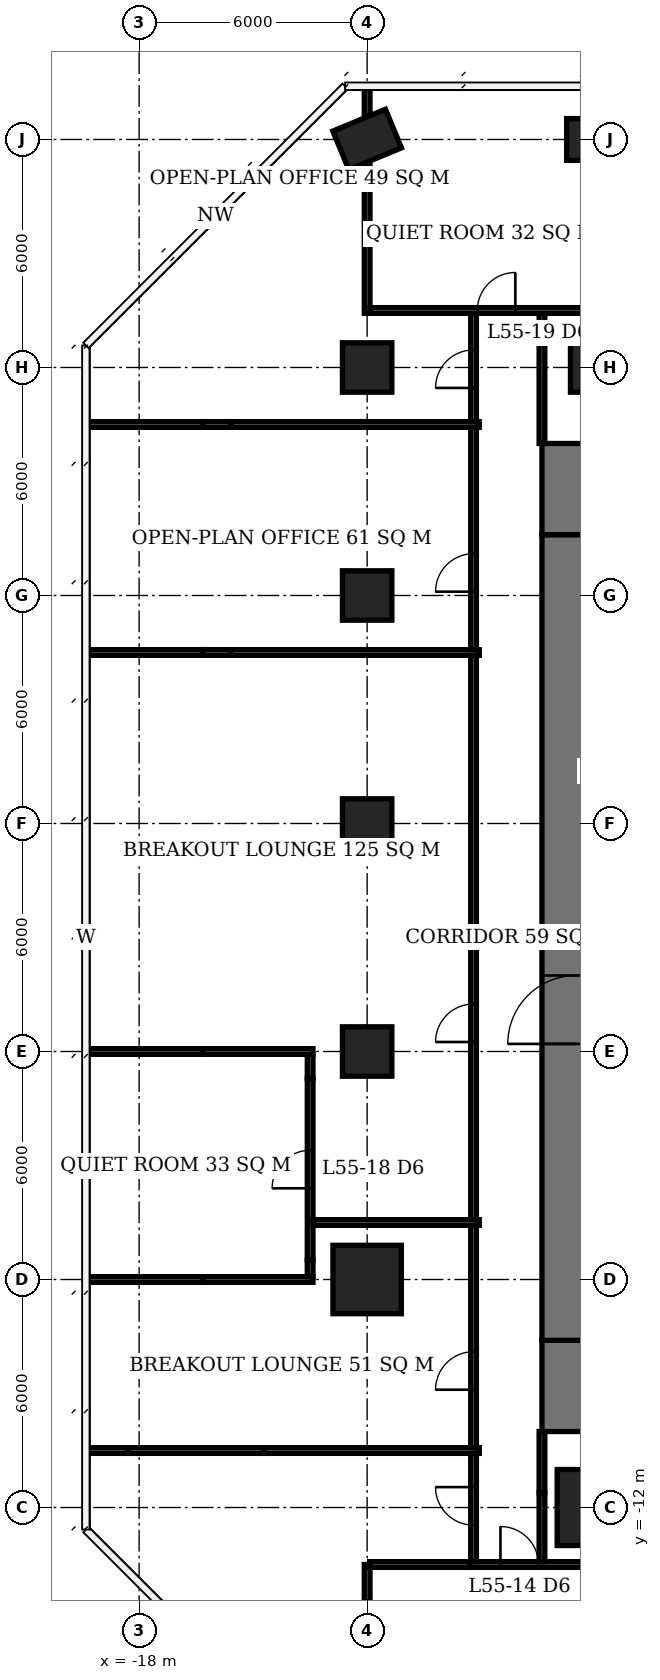
"""IFC4 building model, lengths in metres.
Left out: names, types, materials, properties, quantities, classifications, styles, units other than length and angle.
Written with IfcOpenShell. Run it as: python <this file> out.ifc"""

import sys

from ifc_helpers import new_model, si_unit, direction, frame, frame_2d, origin, origin_2d, place, context, subcontext, project, spatial, rectangle, extrude, element, fill, save


model = new_model("IFC4")
c1 = context("Model", 3, precision=1e-05, world=origin(), true_north=direction((0.0, 1.0)))
c2 = subcontext(c1, "Body", "Model", "MODEL_VIEW")
j1 = project(units=[si_unit("LENGTHUNIT", "METRE"), si_unit("PLANEANGLEUNIT", "RADIAN")], contexts=[c1])
p1 = place(None, origin())
s1 = spatial("IfcSite", under=j1, at=p1, CompositionType="ELEMENT")
p2 = place(p1, origin())
s2 = spatial("IfcBuilding", under=s1, at=p2, CompositionType="ELEMENT")
p3 = place(p2, frame((0.0, 0.0, 224.0)))
s3 = spatial("IfcBuildingStorey", under=s2, at=p3, CompositionType="ELEMENT", Elevation=224.0)
p4 = place(p3, frame((-12.0, -6.0, 0.0), z_axis=(0.0, 0.0, 1.0), x_axis=(1.0, 0.0, 0.0)))
e1 = element("IfcColumn", 1, at=p4, inside=s3, PredefinedType="COLUMN", context=c2, shape_type="SweptSolid", body=[
    extrude(rectangle(XDim=1.8, YDim=1.8, at=origin_2d()), origin(), (0.0, 0.0, 1.0), 3.9),
])
for number, where, z_axis, x_axis in (
    (2, (-12.0, 0.0, 0.0), (0.0, 0.0, 1.0), (1.0, 0.0, 0.0)),
    (3, (-12.0, 6.0, 0.0), (0.0, 0.0, 1.0), (1.0, 0.0, 0.0)),
    (4, (-12.0, 12.0, 0.0), (0.0, 0.0, 1.0), (1.0, 0.0, 0.0)),
    (5, (-12.0, 18.0, 0.0), (0.0, 0.0, 1.0), (1.0, 0.0, 0.0)),
):
    element("IfcColumn", number, at=place(p3, frame(where, z_axis=z_axis, x_axis=x_axis)), inside=s3, PredefinedType="COLUMN", context=c2, shape_type="SweptSolid", body=[
        extrude(rectangle(XDim=1.3, YDim=1.3, at=origin_2d()), origin(), (0.0, 0.0, 1.0), 3.9),
    ])
p5 = place(p3, frame((-12.0, 24.0, 0.0), z_axis=(0.0, 0.0, 1.0), x_axis=(0.923879532511, 0.382683432365, 0.0)))
e6 = element("IfcColumn", 6, at=p5, inside=s3, PredefinedType="COLUMN", context=c2, shape_type="SweptSolid", body=[
    extrude(rectangle(XDim=1.5, YDim=1.1, at=origin_2d()), origin(), (0.0, 0.0, 1.0), 3.9),
])
p6 = place(p3, frame((-6.0, -12.0, 0.0), z_axis=(0.0, 0.0, 1.0), x_axis=(1.0, 0.0, 0.0)))
e7 = element("IfcColumn", 7, at=p6, inside=s3, PredefinedType="COLUMN", context=c2, shape_type="SweptSolid", body=[
    extrude(rectangle(XDim=2.0, YDim=2.0, at=origin_2d()), origin(), (0.0, 0.0, 1.0), 3.9),
])
p7 = place(p3, frame((-6.0, 18.0, 0.0), z_axis=(0.0, 0.0, 1.0), x_axis=(1.0, 0.0, 0.0)))
e8 = element("IfcColumn", 8, at=p7, inside=s3, PredefinedType="COLUMN", context=c2, shape_type="SweptSolid", body=[
    extrude(rectangle(XDim=1.3, YDim=1.3, at=origin_2d()), origin(), (0.0, 0.0, 1.0), 3.9),
])
p8 = place(p3, frame((-6.0, 24.0, 0.0), z_axis=(0.0, 0.0, 1.0), x_axis=(1.0, 0.0, 0.0)))
e9 = element("IfcColumn", 9, at=p8, inside=s3, PredefinedType="COLUMN", context=c2, shape_type="SweptSolid", body=[
    extrude(rectangle(XDim=1.5, YDim=1.1, at=origin_2d()), origin(), (0.0, 0.0, 1.0), 3.9),
])
p9 = place(p3, frame((-6.5, -7.6, 0.0), z_axis=(0.0, 0.0, 1.0), x_axis=(0.0, 1.0, 0.0)))
e10 = element("IfcWall", 10, at=p9, inside=s3, PredefinedType="SHEAR", context=c2, shape_type="SweptSolid", body=[
    extrude(rectangle(XDim=21.2, YDim=1.8, at=frame_2d((10.6, 0.0))), origin(), (0.0, 0.0, 1.0), 3.9),
])
p10 = place(p9, frame((7.8, 0.0, 0.0)))
e11 = element("IfcOpeningElement", 11, at=p10, cuts=e10, PredefinedType="OPENING", context=c2, shape_type="SweptSolid", body=[
    extrude(rectangle(XDim=1.8, YDim=2.4, at=frame_2d((0.9, 1.2))), frame((0.0, 0.91, 0.0), z_axis=(0.0, -1.0, 0.0), x_axis=(1.0, 0.0, 0.0)), (0.0, 0.0, 1.0), 1.82),
])
for number, where, z_axis, x_axis in (
    (12, (-6.5, -10.0, 0.0), (0.0, 0.0, 1.0), (0.0, 1.0, 0.0)),
    (13, (-6.5, 13.6, 0.0), (0.0, 0.0, 1.0), (0.0, 1.0, 0.0)),
):
    element("IfcWall", number, at=place(p3, frame(where, z_axis=z_axis, x_axis=x_axis)), inside=s3, PredefinedType="SHEAR", context=c2, shape_type="SweptSolid", body=[
        extrude(rectangle(XDim=2.4, YDim=1.8, at=frame_2d((1.2, 0.0))), origin(), (0.0, 0.0, 1.0), 3.9),
    ])
p11 = place(p3, frame((-11.935, -13.5, 0.0), z_axis=(0.0, 0.0, 1.0), x_axis=(1.0, 0.0, 0.0)))
e14 = element("IfcWall", 14, at=p11, inside=s3, PredefinedType="PARTITIONING", context=c2, shape_type="SweptSolid", body=[
    extrude(rectangle(XDim=2.643, YDim=0.15, at=frame_2d((1.322, 0.0))), origin(), (0.0, 0.0, 1.0), 3.65),
])
p12 = place(p3, frame((-9.292, -13.5, 0.0), z_axis=(0.0, 0.0, 1.0), x_axis=(1.0, 0.0, 0.0)))
e15 = element("IfcWall", 15, at=p12, inside=s3, PredefinedType="PARTITIONING", context=c2, shape_type="SweptSolid", body=[
    extrude(rectangle(XDim=3.217, YDim=0.15, at=frame_2d((1.608, 0.0))), origin(), (0.0, 0.0, 1.0), 2.65),
])
p13 = place(p12, frame((0.8, 0.0, 0.0)))
e16 = element("IfcOpeningElement", 16, at=p13, cuts=e15, PredefinedType="OPENING", context=c2, shape_type="SweptSolid", body=[
    extrude(rectangle(XDim=1.0, YDim=2.1, at=frame_2d((0.5, 1.05))), frame((0.0, 0.085, 0.0), z_axis=(0.0, -1.0, 0.0), x_axis=(1.0, 0.0, 0.0)), (0.0, 0.0, 1.0), 0.17),
])
p14 = place(p3, frame((-19.4, -6.0, 0.0), z_axis=(0.0, 0.0, 1.0), x_axis=(1.0, 0.0, 0.0)))
e17 = element("IfcWall", 17, at=p14, inside=s3, PredefinedType="PARTITIONING", context=c2, shape_type="SweptSolid", body=[
    extrude(rectangle(XDim=3.09, YDim=0.15, at=frame_2d((1.545, 0.0))), origin(), (0.0, 0.0, 1.0), 3.65),
])
p15 = place(p3, frame((-16.31, -6.0, 0.0), z_axis=(0.0, 0.0, 1.0), x_axis=(1.0, 0.0, 0.0)))
e18 = element("IfcWall", 18, at=p15, inside=s3, PredefinedType="PARTITIONING", context=c2, shape_type="SweptSolid", body=[
    extrude(rectangle(XDim=2.885, YDim=0.15, at=frame_2d((1.442, 0.0))), origin(), (0.0, 0.0, 1.0), 2.65),
])
p16 = place(p3, frame((-19.35, 0.0, 0.0), z_axis=(0.0, 0.0, 1.0), x_axis=(1.0, 0.0, 0.0)))
e19 = element("IfcWall", 19, at=p16, inside=s3, PredefinedType="PARTITIONING", context=c2, shape_type="SweptSolid", body=[
    extrude(rectangle(XDim=3.04, YDim=0.15, at=frame_2d((1.52, 0.0))), origin(), (0.0, 0.0, 1.0), 3.65),
])
p17 = place(p3, frame((-16.31, 0.0, 0.0), z_axis=(0.0, 0.0, 1.0), x_axis=(1.0, 0.0, 0.0)))
e20 = element("IfcWall", 20, at=p17, inside=s3, PredefinedType="PARTITIONING", context=c2, shape_type="SweptSolid", body=[
    extrude(rectangle(XDim=2.885, YDim=0.15, at=frame_2d((1.442, 0.0))), origin(), (0.0, 0.0, 1.0), 2.65),
])
p18 = place(p3, frame((-11.925, 19.5, 0.0), z_axis=(0.0, 0.0, 1.0), x_axis=(1.0, 0.0, 0.0)))
e21 = element("IfcWall", 21, at=p18, inside=s3, PredefinedType="PARTITIONING", context=c2, shape_type="SweptSolid", body=[
    extrude(rectangle(XDim=5.85, YDim=0.15, at=frame_2d((2.925, 0.0))), origin(), (0.0, 0.0, 1.0), 3.65),
])
p19 = place(p18, frame((2.825, 0.0, 0.0)))
e22 = element("IfcOpeningElement", 22, at=p19, cuts=e21, PredefinedType="OPENING", context=c2, shape_type="SweptSolid", body=[
    extrude(rectangle(XDim=1.0, YDim=2.1, at=frame_2d((0.5, 1.05))), frame((0.0, 0.085, 0.0), z_axis=(0.0, -1.0, 0.0), x_axis=(1.0, 0.0, 0.0)), (0.0, 0.0, 1.0), 0.17),
])
p20 = place(p3, frame((-13.5, -5.925, 0.0), z_axis=(0.0, 0.0, 1.0), x_axis=(0.0, 1.0, 0.0)))
e23 = element("IfcWall", 23, at=p20, inside=s3, PredefinedType="PARTITIONING", context=c2, shape_type="SweptSolid", body=[
    extrude(rectangle(XDim=0.435, YDim=0.15, at=frame_2d((0.218, 0.0))), origin(), (0.0, 0.0, 1.0), 2.65),
])
p21 = place(p3, frame((-13.5, -5.49, 0.0), z_axis=(0.0, 0.0, 1.0), x_axis=(0.0, 1.0, 0.0)))
e24 = element("IfcWall", 24, at=p21, inside=s3, PredefinedType="PARTITIONING", context=c2, shape_type="SweptSolid", body=[
    extrude(rectangle(XDim=4.78, YDim=0.15, at=frame_2d((2.39, 0.0))), origin(), (0.0, 0.0, 1.0), 3.65),
])
p22 = place(p21, frame((1.89, 0.0, 0.0)))
e25 = element("IfcOpeningElement", 25, at=p22, cuts=e24, PredefinedType="OPENING", context=c2, shape_type="SweptSolid", body=[
    extrude(rectangle(XDim=1.0, YDim=2.1, at=frame_2d((0.5, 1.05))), frame((0.0, 0.085, 0.0), z_axis=(0.0, -1.0, 0.0), x_axis=(1.0, 0.0, 0.0)), (0.0, 0.0, 1.0), 0.17),
])
p23 = place(p3, frame((-13.5, -0.71, 0.0), z_axis=(0.0, 0.0, 1.0), x_axis=(0.0, 1.0, 0.0)))
e26 = element("IfcWall", 26, at=p23, inside=s3, PredefinedType="PARTITIONING", context=c2, shape_type="SweptSolid", body=[
    extrude(rectangle(XDim=0.635, YDim=0.15, at=frame_2d((0.317, 0.0))), origin(), (0.0, 0.0, 1.0), 2.65),
])
p24 = place(p3, frame((-12.0, -14.49, 0.0), z_axis=(0.0, 0.0, 1.0), x_axis=(0.0, 1.0, 0.0)))
e27 = element("IfcWall", 27, at=p24, inside=s3, PredefinedType="PARTITIONING", context=c2, shape_type="SweptSolid", body=[
    extrude(rectangle(XDim=0.99, YDim=0.15, at=frame_2d((0.495, 0.0))), origin(), (0.0, 0.0, 1.0), 2.65),
])
p25 = place(p3, frame((-12.0, 19.425, 0.0), z_axis=(0.0, 0.0, 1.0), x_axis=(0.0, 1.0, 0.0)))
e28 = element("IfcWall", 28, at=p25, inside=s3, PredefinedType="PARTITIONING", context=c2, shape_type="SweptSolid", body=[
    extrude(rectangle(XDim=3.948, YDim=0.15, at=frame_2d((1.974, 0.0))), origin(), (0.0, 0.0, 1.0), 3.65),
])
p26 = place(p3, frame((-12.0, 24.626, 0.0), z_axis=(0.0, 0.0, 1.0), x_axis=(0.0, 1.0, 0.0)))
e29 = element("IfcWall", 29, at=p26, inside=s3, PredefinedType="PARTITIONING", context=c2, shape_type="SweptSolid", body=[
    extrude(rectangle(XDim=0.773, YDim=0.15, at=frame_2d((0.387, 0.0))), origin(), (0.0, 0.0, 1.0), 3.65),
])
p27 = place(p3, frame((-19.4, -10.5, 0.0), z_axis=(0.0, 0.0, 1.0), x_axis=(1.0, 0.0, 0.0)))
e30 = element("IfcWall", 30, at=p27, inside=s3, PredefinedType="PARTITIONING", context=c2, shape_type="SweptSolid", body=[
    extrude(rectangle(XDim=1.108, YDim=0.15, at=frame_2d((0.554, 0.0))), origin(), (0.0, 0.0, 1.0), 3.65),
])
p28 = place(p3, frame((-18.292, -10.5, 0.0), z_axis=(0.0, 0.0, 1.0), x_axis=(1.0, 0.0, 0.0)))
e31 = element("IfcWall", 31, at=p28, inside=s3, PredefinedType="PARTITIONING", context=c2, shape_type="SweptSolid", body=[
    extrude(rectangle(XDim=3.584, YDim=0.15, at=frame_2d((1.792, 0.0))), origin(), (0.0, 0.0, 1.0), 2.65),
])
p29 = place(p3, frame((-14.708, -10.5, 0.0), z_axis=(0.0, 0.0, 1.0), x_axis=(1.0, 0.0, 0.0)))
e32 = element("IfcWall", 32, at=p29, inside=s3, PredefinedType="PARTITIONING", context=c2, shape_type="SweptSolid", body=[
    extrude(rectangle(XDim=5.658, YDim=0.15, at=frame_2d((2.829, 0.0))), origin(), (0.0, 0.0, 1.0), 3.65),
])
p30 = place(p3, frame((-19.4, 10.5, 0.0), z_axis=(0.0, 0.0, 1.0), x_axis=(1.0, 0.0, 0.0)))
e33 = element("IfcWall", 33, at=p30, inside=s3, PredefinedType="PARTITIONING", context=c2, shape_type="SweptSolid", body=[
    extrude(rectangle(XDim=3.09, YDim=0.15, at=frame_2d((1.545, 0.0))), origin(), (0.0, 0.0, 1.0), 3.65),
])
p31 = place(p3, frame((-16.31, 10.5, 0.0), z_axis=(0.0, 0.0, 1.0), x_axis=(1.0, 0.0, 0.0)))
e34 = element("IfcWall", 34, at=p31, inside=s3, PredefinedType="PARTITIONING", context=c2, shape_type="SweptSolid", body=[
    extrude(rectangle(XDim=0.72, YDim=0.15, at=frame_2d((0.36, 0.0))), origin(), (0.0, 0.0, 1.0), 2.65),
])
p32 = place(p3, frame((-15.59, 10.5, 0.0), z_axis=(0.0, 0.0, 1.0), x_axis=(1.0, 0.0, 0.0)))
e35 = element("IfcWall", 35, at=p32, inside=s3, PredefinedType="PARTITIONING", context=c2, shape_type="SweptSolid", body=[
    extrude(rectangle(XDim=6.54, YDim=0.15, at=frame_2d((3.27, 0.0))), origin(), (0.0, 0.0, 1.0), 3.65),
])
p33 = place(p3, frame((-19.4, 16.5, 0.0), z_axis=(0.0, 0.0, 1.0), x_axis=(1.0, 0.0, 0.0)))
e36 = element("IfcWall", 36, at=p33, inside=s3, PredefinedType="PARTITIONING", context=c2, shape_type="SweptSolid", body=[
    extrude(rectangle(XDim=3.09, YDim=0.15, at=frame_2d((1.545, 0.0))), origin(), (0.0, 0.0, 1.0), 3.65),
])
p34 = place(p3, frame((-16.31, 16.5, 0.0), z_axis=(0.0, 0.0, 1.0), x_axis=(1.0, 0.0, 0.0)))
e37 = element("IfcWall", 37, at=p34, inside=s3, PredefinedType="PARTITIONING", context=c2, shape_type="SweptSolid", body=[
    extrude(rectangle(XDim=0.72, YDim=0.15, at=frame_2d((0.36, 0.0))), origin(), (0.0, 0.0, 1.0), 2.65),
])
p35 = place(p3, frame((-15.59, 16.5, 0.0), z_axis=(0.0, 0.0, 1.0), x_axis=(1.0, 0.0, 0.0)))
e38 = element("IfcWall", 38, at=p35, inside=s3, PredefinedType="PARTITIONING", context=c2, shape_type="SweptSolid", body=[
    extrude(rectangle(XDim=6.54, YDim=0.15, at=frame_2d((3.27, 0.0))), origin(), (0.0, 0.0, 1.0), 3.65),
])
p36 = place(p3, frame((-13.425, -4.5, 0.0), z_axis=(0.0, 0.0, 1.0), x_axis=(1.0, 0.0, 0.0)))
e39 = element("IfcWall", 39, at=p36, inside=s3, PredefinedType="PARTITIONING", context=c2, shape_type="SweptSolid", body=[
    extrude(rectangle(XDim=4.375, YDim=0.15, at=frame_2d((2.188, 0.0))), origin(), (0.0, 0.0, 1.0), 3.65),
])
p37 = place(p3, frame((-9.2, -13.425, 0.0), z_axis=(0.0, 0.0, 1.0), x_axis=(0.0, 1.0, 0.0)))
e40 = element("IfcWall", 40, at=p37, inside=s3, PredefinedType="PARTITIONING", context=c2, shape_type="SweptSolid", body=[
    extrude(rectangle(XDim=2.85, YDim=0.15, at=frame_2d((1.425, 0.0))), origin(), (0.0, 0.0, 1.0), 3.65),
])
p38 = place(p37, frame((0.962, 0.0, 0.0)))
e41 = element("IfcOpeningElement", 41, at=p38, cuts=e40, PredefinedType="OPENING", context=c2, shape_type="SweptSolid", body=[
    extrude(rectangle(XDim=1.0, YDim=2.1, at=frame_2d((0.5, 1.05))), frame((0.0, 0.085, 0.0), z_axis=(0.0, -1.0, 0.0), x_axis=(1.0, 0.0, 0.0)), (0.0, 0.0, 1.0), 0.17),
])
p39 = place(p3, frame((-9.2, -10.425, 0.0), z_axis=(0.0, 0.0, 1.0), x_axis=(0.0, 1.0, 0.0)))
e42 = element("IfcWall", 42, at=p39, inside=s3, PredefinedType="PARTITIONING", context=c2, shape_type="SweptSolid", body=[
    extrude(rectangle(XDim=5.85, YDim=0.15, at=frame_2d((2.925, 0.0))), origin(), (0.0, 0.0, 1.0), 3.65),
])
p40 = place(p39, frame((1.525, 0.0, 0.0)))
e43 = element("IfcOpeningElement", 43, at=p40, cuts=e42, PredefinedType="OPENING", context=c2, shape_type="SweptSolid", body=[
    extrude(rectangle(XDim=1.0, YDim=2.1, at=frame_2d((0.5, 1.05))), frame((0.0, 0.085, 0.0), z_axis=(0.0, -1.0, 0.0), x_axis=(1.0, 0.0, 0.0)), (0.0, 0.0, 1.0), 0.17),
])
p41 = place(p3, frame((-9.2, -4.425, 0.0), z_axis=(0.0, 0.0, 1.0), x_axis=(0.0, 1.0, 0.0)))
e44 = element("IfcWall", 44, at=p41, inside=s3, PredefinedType="PARTITIONING", context=c2, shape_type="SweptSolid", body=[
    extrude(rectangle(XDim=14.85, YDim=0.15, at=frame_2d((7.425, 0.0))), origin(), (0.0, 0.0, 1.0), 3.65),
])
p42 = place(p41, frame((4.675, 0.0, 0.0)))
e45 = element("IfcOpeningElement", 45, at=p42, cuts=e44, PredefinedType="OPENING", context=c2, shape_type="SweptSolid", body=[
    extrude(rectangle(XDim=1.0, YDim=2.1, at=frame_2d((0.5, 1.05))), frame((0.0, 0.085, 0.0), z_axis=(0.0, -1.0, 0.0), x_axis=(1.0, 0.0, 0.0)), (0.0, 0.0, 1.0), 0.17),
])
p43 = place(p3, frame((-9.2, 10.575, 0.0), z_axis=(0.0, 0.0, 1.0), x_axis=(0.0, 1.0, 0.0)))
e46 = element("IfcWall", 46, at=p43, inside=s3, PredefinedType="PARTITIONING", context=c2, shape_type="SweptSolid", body=[
    extrude(rectangle(XDim=5.85, YDim=0.15, at=frame_2d((2.925, 0.0))), origin(), (0.0, 0.0, 1.0), 3.65),
])
p44 = place(p43, frame((1.525, 0.0, 0.0)))
e47 = element("IfcOpeningElement", 47, at=p44, cuts=e46, PredefinedType="OPENING", context=c2, shape_type="SweptSolid", body=[
    extrude(rectangle(XDim=1.0, YDim=2.1, at=frame_2d((0.5, 1.05))), frame((0.0, 0.085, 0.0), z_axis=(0.0, -1.0, 0.0), x_axis=(1.0, 0.0, 0.0)), (0.0, 0.0, 1.0), 0.17),
])
p45 = place(p3, frame((-9.2, 16.575, 0.0), z_axis=(0.0, 0.0, 1.0), x_axis=(0.0, 1.0, 0.0)))
e48 = element("IfcWall", 48, at=p45, inside=s3, PredefinedType="PARTITIONING", context=c2, shape_type="SweptSolid", body=[
    extrude(rectangle(XDim=2.85, YDim=0.15, at=frame_2d((1.425, 0.0))), origin(), (0.0, 0.0, 1.0), 3.65),
])
p46 = place(p45, frame((0.887, 0.0, 0.0)))
e49 = element("IfcOpeningElement", 49, at=p46, cuts=e48, PredefinedType="OPENING", context=c2, shape_type="SweptSolid", body=[
    extrude(rectangle(XDim=1.0, YDim=2.1, at=frame_2d((0.5, 1.05))), frame((0.0, 0.085, 0.0), z_axis=(0.0, -1.0, 0.0), x_axis=(1.0, 0.0, 0.0)), (0.0, 0.0, 1.0), 0.17),
])
p47 = place(p3, frame((-7.4, -13.425, 0.0), z_axis=(0.0, 0.0, 1.0), x_axis=(0.0, 1.0, 0.0)))
e50 = element("IfcWall", 50, at=p47, inside=s3, PredefinedType="PARTITIONING", context=c2, shape_type="SweptSolid", body=[
    extrude(rectangle(XDim=1.817, YDim=0.15, at=frame_2d((0.909, 0.0))), origin(), (0.0, 0.0, 1.0), 2.65),
])
p48 = place(p3, frame((-7.4, -11.608, 0.0), z_axis=(0.0, 0.0, 1.0), x_axis=(0.0, 1.0, 0.0)))
e51 = element("IfcWall", 51, at=p48, inside=s3, PredefinedType="PARTITIONING", context=c2, shape_type="SweptSolid", body=[
    extrude(rectangle(XDim=1.608, YDim=0.15, at=frame_2d((0.804, 0.0))), origin(), (0.0, 0.0, 1.0), 3.65),
])
p49 = place(p3, frame((-7.4, 16.0, 0.0), z_axis=(0.0, 0.0, 1.0), x_axis=(0.0, 1.0, 0.0)))
e52 = element("IfcWall", 52, at=p49, inside=s3, PredefinedType="PARTITIONING", context=c2, shape_type="SweptSolid", body=[
    extrude(rectangle(XDim=3.425, YDim=0.15, at=frame_2d((1.712, 0.0))), origin(), (0.0, 0.0, 1.0), 3.65),
])
p50 = place(p10, origin())
e53 = element("IfcDoor", 53, at=p50, inside=s3, OperationType="DOUBLE_DOOR_SINGLE_SWING", PredefinedType="DOOR", context=c2, shape_type="SweptSolid", body=[
    extrude(rectangle(XDim=1.8, YDim=2.4, at=frame_2d((0.9, 1.2))), frame((0.0, 0.025, 0.0), z_axis=(0.0, -1.0, 0.0), x_axis=(1.0, 0.0, 0.0)), (0.0, 0.0, 1.0), 0.05),
])
fill(e11, e53)
p51 = place(p13, origin())
e54 = element("IfcDoor", 54, at=p51, inside=s3, OperationType="SINGLE_SWING_LEFT", PredefinedType="DOOR", context=c2, shape_type="SweptSolid", body=[
    extrude(rectangle(XDim=1.0, YDim=2.1, at=frame_2d((0.5, 1.05))), frame((0.0, 0.025, 0.0), z_axis=(0.0, -1.0, 0.0), x_axis=(1.0, 0.0, 0.0)), (0.0, 0.0, 1.0), 0.05),
])
fill(e16, e54)
p52 = place(p22, origin())
e55 = element("IfcDoor", 55, at=p52, inside=s3, OperationType="SINGLE_SWING_LEFT", PredefinedType="DOOR", context=c2, shape_type="SweptSolid", body=[
    extrude(rectangle(XDim=1.0, YDim=2.1, at=frame_2d((0.5, 1.05))), frame((0.0, 0.025, 0.0), z_axis=(0.0, -1.0, 0.0), x_axis=(1.0, 0.0, 0.0)), (0.0, 0.0, 1.0), 0.05),
])
fill(e25, e55)
p53 = place(p19, origin())
e56 = element("IfcDoor", 56, at=p53, inside=s3, OperationType="SINGLE_SWING_RIGHT", PredefinedType="DOOR", context=c2, shape_type="SweptSolid", body=[
    extrude(rectangle(XDim=1.0, YDim=2.1, at=frame_2d((0.5, 1.05))), frame((0.0, 0.025, 0.0), z_axis=(0.0, -1.0, 0.0), x_axis=(1.0, 0.0, 0.0)), (0.0, 0.0, 1.0), 0.05),
])
fill(e22, e56)
p54 = place(p38, origin())
e57 = element("IfcDoor", 57, at=p54, inside=s3, OperationType="SINGLE_SWING_RIGHT", PredefinedType="DOOR", context=c2, shape_type="SweptSolid", body=[
    extrude(rectangle(XDim=1.0, YDim=2.1, at=frame_2d((0.5, 1.05))), frame((0.0, 0.025, 0.0), z_axis=(0.0, -1.0, 0.0), x_axis=(1.0, 0.0, 0.0)), (0.0, 0.0, 1.0), 0.05),
])
fill(e41, e57)
p55 = place(p40, origin())
e58 = element("IfcDoor", 58, at=p55, inside=s3, OperationType="SINGLE_SWING_LEFT", PredefinedType="DOOR", context=c2, shape_type="SweptSolid", body=[
    extrude(rectangle(XDim=1.0, YDim=2.1, at=frame_2d((0.5, 1.05))), frame((0.0, 0.025, 0.0), z_axis=(0.0, -1.0, 0.0), x_axis=(1.0, 0.0, 0.0)), (0.0, 0.0, 1.0), 0.05),
])
fill(e43, e58)
p56 = place(p42, origin())
e59 = element("IfcDoor", 59, at=p56, inside=s3, OperationType="SINGLE_SWING_LEFT", PredefinedType="DOOR", context=c2, shape_type="SweptSolid", body=[
    extrude(rectangle(XDim=1.0, YDim=2.1, at=frame_2d((0.5, 1.05))), frame((0.0, 0.025, 0.0), z_axis=(0.0, -1.0, 0.0), x_axis=(1.0, 0.0, 0.0)), (0.0, 0.0, 1.0), 0.05),
])
fill(e45, e59)
p57 = place(p44, origin())
e60 = element("IfcDoor", 60, at=p57, inside=s3, OperationType="SINGLE_SWING_LEFT", PredefinedType="DOOR", context=c2, shape_type="SweptSolid", body=[
    extrude(rectangle(XDim=1.0, YDim=2.1, at=frame_2d((0.5, 1.05))), frame((0.0, 0.025, 0.0), z_axis=(0.0, -1.0, 0.0), x_axis=(1.0, 0.0, 0.0)), (0.0, 0.0, 1.0), 0.05),
])
fill(e47, e60)
p58 = place(p46, origin())
e61 = element("IfcDoor", 61, at=p58, inside=s3, OperationType="SINGLE_SWING_LEFT", PredefinedType="DOOR", context=c2, shape_type="SweptSolid", body=[
    extrude(rectangle(XDim=1.0, YDim=2.1, at=frame_2d((0.5, 1.05))), frame((0.0, 0.025, 0.0), z_axis=(0.0, -1.0, 0.0), x_axis=(1.0, 0.0, 0.0)), (0.0, 0.0, 1.0), 0.05),
])
fill(e49, e61)
save(model, sys.argv[1])
